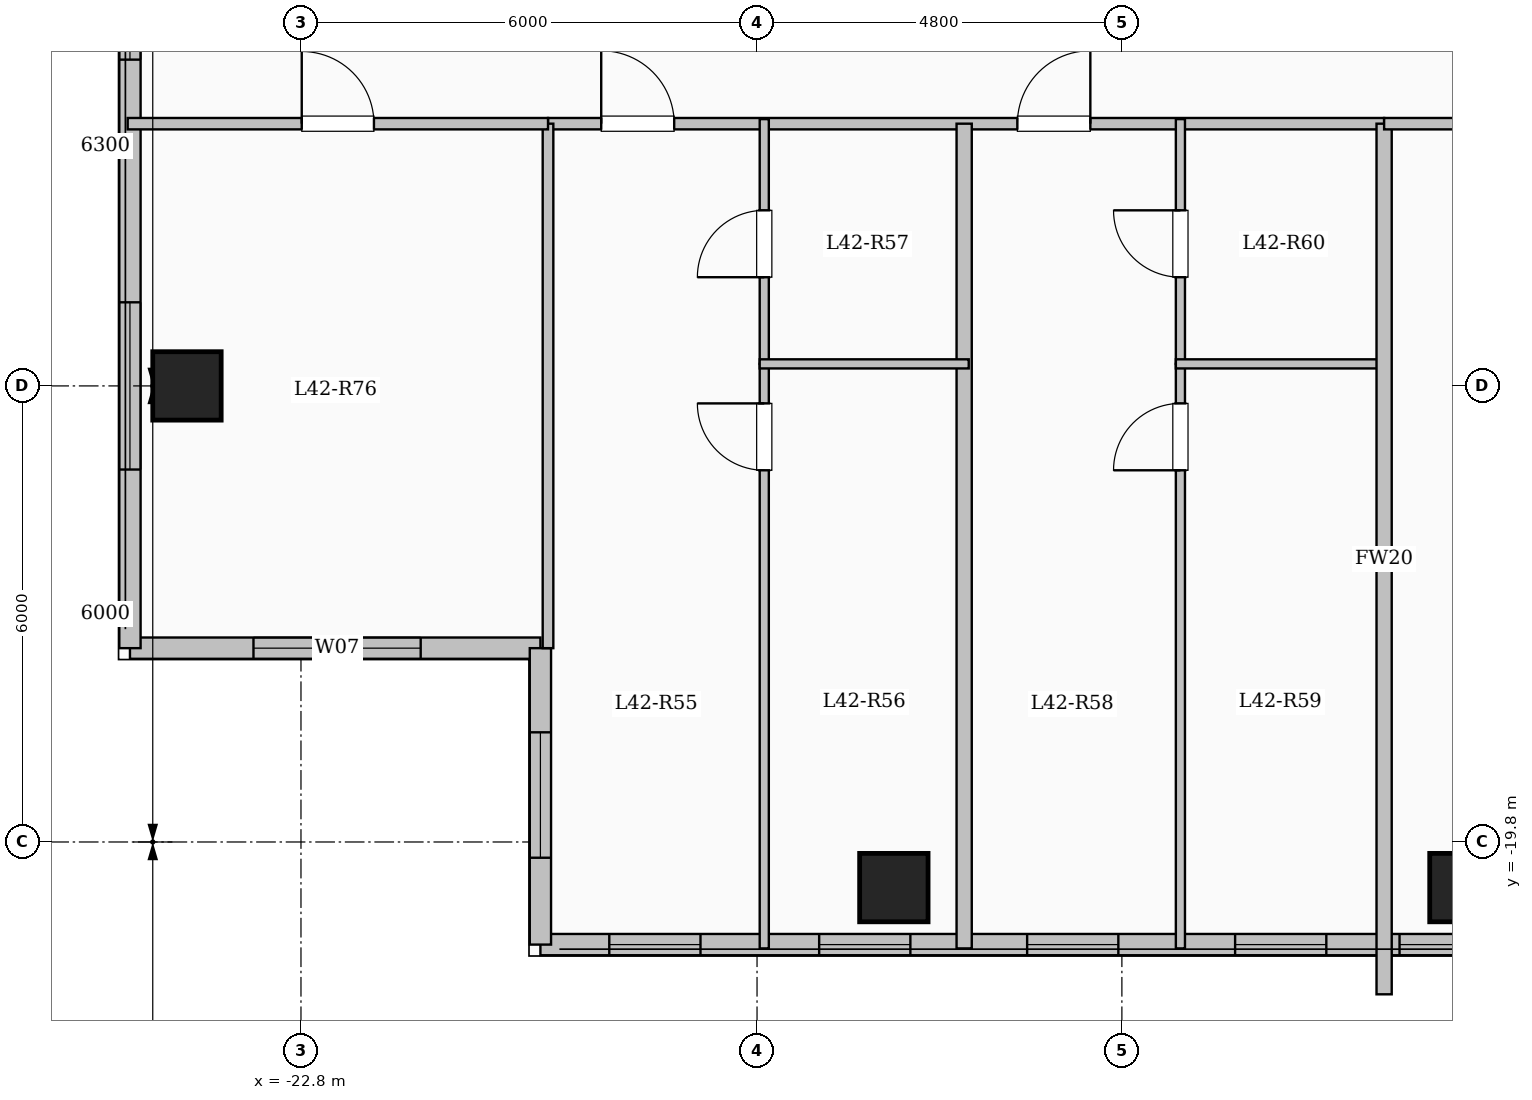
"""IFC4 building model, lengths in metres.
Left out: names, types, materials, properties, quantities, classifications, styles, units other than length and angle.
Written with IfcOpenShell. Run it as: python <this file> out.ifc"""

import sys

from ifc_helpers import new_model, si_unit, direction, frame, frame_2d, origin, origin_2d, place, context, subcontext, project, spatial, rectangle, extrude, element, fill, save


model = new_model("IFC4")
c1 = context("Model", 3, precision=1e-05, world=origin(), true_north=direction((0.0, 1.0)))
c2 = subcontext(c1, "Body", "Model", "MODEL_VIEW")
j1 = project(units=[si_unit("LENGTHUNIT", "METRE"), si_unit("PLANEANGLEUNIT", "RADIAN")], contexts=[c1])
p1 = place(None, origin())
s1 = spatial("IfcSite", under=j1, at=p1, CompositionType="ELEMENT")
p2 = place(p1, origin())
s2 = spatial("IfcBuilding", under=s1, at=p2, CompositionType="ELEMENT")
p3 = place(p2, frame((0.0, 0.0, 156.05)))
s3 = spatial("IfcBuildingStorey", under=s2, at=p3, CompositionType="ELEMENT", Elevation=156.05)
for number, where, z_axis, x_axis in (
    (1, (-15.0, -20.4, 0.0), (0.0, 0.0, 1.0), (1.0, 0.0, 0.0)),
    (2, (-7.5, -20.4, 0.0), (0.0, 0.0, 1.0), (1.0, 0.0, 0.0)),
    (3, (-24.3, -13.8, 0.0), (0.0, 0.0, 1.0), (1.0, 0.0, 0.0)),
):
    element("IfcColumn", number, at=place(p3, frame(where, z_axis=z_axis, x_axis=x_axis)), inside=s3, PredefinedType="COLUMN", context=c2, shape_type="SweptSolid", body=[
        extrude(rectangle(XDim=0.9, YDim=0.9, at=origin_2d()), origin(), (0.0, 0.0, 1.0), 3.35),
    ])
p4 = place(p3, frame((-19.65, -17.25, 0.0), z_axis=(0.0, 0.0, 1.0), x_axis=(-1.0, 0.0, 0.0)))
e4 = element("IfcWall", 4, at=p4, inside=s3, PredefinedType="SOLIDWALL", context=c2, shape_type="SweptSolid", body=[
    extrude(rectangle(XDim=5.4, YDim=0.28, at=frame_2d((2.7, 0.0))), origin(), (0.0, 0.0, 1.0), 3.1),
])
p5 = place(p4, frame((1.575, 0.0, 0.9)))
e5 = element("IfcOpeningElement", 5, at=p5, cuts=e4, PredefinedType="OPENING", context=c2, shape_type="SweptSolid", body=[
    extrude(rectangle(XDim=2.2, YDim=1.75, at=frame_2d((1.1, 0.875))), frame((0.0, 0.15, 0.0), z_axis=(0.0, -1.0, 0.0), x_axis=(1.0, 0.0, 0.0)), (0.0, 0.0, 1.0), 0.3),
])
p6 = place(p3, frame((-25.05, -17.25, 0.0), z_axis=(0.0, 0.0, 1.0), x_axis=(0.0, 1.0, 0.0)))
e6 = element("IfcWall", 6, at=p6, inside=s3, PredefinedType="SOLIDWALL", context=c2, shape_type="SweptSolid", body=[
    extrude(rectangle(XDim=34.5, YDim=0.28, at=frame_2d((17.25, 0.0))), origin(), (0.0, 0.0, 1.0), 3.1),
])
p7 = place(p6, frame((2.35, 0.0, 0.9)))
e7 = element("IfcOpeningElement", 7, at=p7, cuts=e6, PredefinedType="OPENING", context=c2, shape_type="SweptSolid", body=[
    extrude(rectangle(XDim=2.2, YDim=1.75, at=frame_2d((1.1, 0.875))), frame((0.0, 0.15, 0.0), z_axis=(0.0, -1.0, 0.0), x_axis=(1.0, 0.0, 0.0)), (0.0, 0.0, 1.0), 0.3),
])
p8 = place(p6, frame((7.742, 0.0, 0.9)))
e8 = element("IfcOpeningElement", 8, at=p8, cuts=e6, PredefinedType="OPENING", context=c2, shape_type="SweptSolid", body=[
    extrude(rectangle(XDim=1.5, YDim=1.65, at=frame_2d((0.75, 0.825))), frame((0.0, 0.15, 0.0), z_axis=(0.0, -1.0, 0.0), x_axis=(1.0, 0.0, 0.0)), (0.0, 0.0, 1.0), 0.3),
])
p9 = place(p6, frame((18.0, 0.0, 0.9)))
e9 = element("IfcOpeningElement", 9, at=p9, cuts=e6, PredefinedType="OPENING", context=c2, shape_type="SweptSolid", body=[
    extrude(rectangle(XDim=2.0, YDim=1.7, at=frame_2d((1.0, 0.85))), frame((0.0, 0.15, 0.0), z_axis=(0.0, -1.0, 0.0), x_axis=(1.0, 0.0, 0.0)), (0.0, 0.0, 1.0), 0.3),
])
p10 = place(p6, frame((28.375, 0.0, 0.95)))
e10 = element("IfcOpeningElement", 10, at=p10, cuts=e6, PredefinedType="OPENING", context=c2, shape_type="SweptSolid", body=[
    extrude(rectangle(XDim=1.0, YDim=1.5, at=frame_2d((0.5, 0.75))), frame((0.0, 0.15, 0.0), z_axis=(0.0, -1.0, 0.0), x_axis=(1.0, 0.0, 0.0)), (0.0, 0.0, 1.0), 0.3),
])
p11 = place(p6, frame((31.125, 0.0, 0.9)))
e11 = element("IfcOpeningElement", 11, at=p11, cuts=e6, PredefinedType="OPENING", context=c2, shape_type="SweptSolid", body=[
    extrude(rectangle(XDim=2.0, YDim=1.7, at=frame_2d((1.0, 0.85))), frame((0.0, 0.15, 0.0), z_axis=(0.0, -1.0, 0.0), x_axis=(1.0, 0.0, 0.0)), (0.0, 0.0, 1.0), 0.3),
])
p12 = place(p3, frame((-7.35, -21.15, 0.0), z_axis=(0.0, 0.0, 1.0), x_axis=(-1.0, 0.0, 0.0)))
e12 = element("IfcWall", 12, at=p12, inside=s3, PredefinedType="SOLIDWALL", context=c2, shape_type="SweptSolid", body=[
    extrude(rectangle(XDim=12.3, YDim=0.28, at=frame_2d((6.15, 0.0))), origin(), (0.0, 0.0, 1.0), 3.1),
])
p13 = place(p12, frame((0.147, 0.0, 0.95)))
e13 = element("IfcOpeningElement", 13, at=p13, cuts=e12, PredefinedType="OPENING", context=c2, shape_type="SweptSolid", body=[
    extrude(rectangle(XDim=0.85, YDim=1.5, at=frame_2d((0.425, 0.75))), frame((0.0, 0.15, 0.0), z_axis=(0.0, -1.0, 0.0), x_axis=(1.0, 0.0, 0.0)), (0.0, 0.0, 1.0), 0.3),
])
p14 = place(p12, frame((1.96, 0.0, 0.95)))
e14 = element("IfcOpeningElement", 14, at=p14, cuts=e12, PredefinedType="OPENING", context=c2, shape_type="SweptSolid", body=[
    extrude(rectangle(XDim=1.2, YDim=1.5, at=frame_2d((0.6, 0.75))), frame((0.0, 0.15, 0.0), z_axis=(0.0, -1.0, 0.0), x_axis=(1.0, 0.0, 0.0)), (0.0, 0.0, 1.0), 0.3),
])
p15 = place(p12, frame((4.697, 0.0, 0.95)))
e15 = element("IfcOpeningElement", 15, at=p15, cuts=e12, PredefinedType="OPENING", context=c2, shape_type="SweptSolid", body=[
    extrude(rectangle(XDim=1.2, YDim=1.5, at=frame_2d((0.6, 0.75))), frame((0.0, 0.15, 0.0), z_axis=(0.0, -1.0, 0.0), x_axis=(1.0, 0.0, 0.0)), (0.0, 0.0, 1.0), 0.3),
])
p16 = place(p12, frame((7.433, 0.0, 0.95)))
e16 = element("IfcOpeningElement", 16, at=p16, cuts=e12, PredefinedType="OPENING", context=c2, shape_type="SweptSolid", body=[
    extrude(rectangle(XDim=1.2, YDim=1.5, at=frame_2d((0.6, 0.75))), frame((0.0, 0.15, 0.0), z_axis=(0.0, -1.0, 0.0), x_axis=(1.0, 0.0, 0.0)), (0.0, 0.0, 1.0), 0.3),
])
p17 = place(p12, frame((10.194, 0.0, 0.95)))
e17 = element("IfcOpeningElement", 17, at=p17, cuts=e12, PredefinedType="OPENING", context=c2, shape_type="SweptSolid", body=[
    extrude(rectangle(XDim=1.2, YDim=1.5, at=frame_2d((0.6, 0.75))), frame((0.0, 0.15, 0.0), z_axis=(0.0, -1.0, 0.0), x_axis=(1.0, 0.0, 0.0)), (0.0, 0.0, 1.0), 0.3),
])
p18 = place(p3, frame((-19.65, -21.15, 0.0), z_axis=(0.0, 0.0, 1.0), x_axis=(0.0, 1.0, 0.0)))
e18 = element("IfcWall", 18, at=p18, inside=s3, PredefinedType="SOLIDWALL", context=c2, shape_type="SweptSolid", body=[
    extrude(rectangle(XDim=3.9, YDim=0.28, at=frame_2d((1.95, 0.0))), origin(), (0.0, 0.0, 1.0), 3.1),
])
p19 = place(p18, frame((1.143, 0.0, 0.9)))
e19 = element("IfcOpeningElement", 19, at=p19, cuts=e18, PredefinedType="OPENING", context=c2, shape_type="SweptSolid", body=[
    extrude(rectangle(XDim=1.65, YDim=1.6, at=frame_2d((0.825, 0.8))), frame((0.0, 0.15, 0.0), z_axis=(0.0, -1.0, 0.0), x_axis=(1.0, 0.0, 0.0)), (0.0, 0.0, 1.0), 0.3),
])
p20 = place(p3, frame((-19.55, -10.35, 0.0), z_axis=(0.0, 0.0, 1.0), x_axis=(1.0, 0.0, 0.0)))
e20 = element("IfcWall", 20, at=p20, inside=s3, PredefinedType="PARTITIONING", context=c2, shape_type="SweptSolid", body=[
    extrude(rectangle(XDim=11.0, YDim=0.15, at=frame_2d((5.5, 0.0))), origin(), (0.0, 0.0, 1.0), 3.1),
])
p21 = place(p20, frame((0.7, 0.0, 0.0)))
e21 = element("IfcOpeningElement", 21, at=p21, cuts=e20, PredefinedType="OPENING", context=c2, shape_type="SweptSolid", body=[
    extrude(rectangle(XDim=0.96, YDim=2.15, at=frame_2d((0.48, 1.075))), frame((0.0, 0.085, 0.0), z_axis=(0.0, -1.0, 0.0), x_axis=(1.0, 0.0, 0.0)), (0.0, 0.0, 1.0), 0.17),
])
p22 = place(p20, frame((6.175, 0.0, 0.0)))
e22 = element("IfcOpeningElement", 22, at=p22, cuts=e20, PredefinedType="OPENING", context=c2, shape_type="SweptSolid", body=[
    extrude(rectangle(XDim=0.96, YDim=2.15, at=frame_2d((0.48, 1.075))), frame((0.0, 0.085, 0.0), z_axis=(0.0, -1.0, 0.0), x_axis=(1.0, 0.0, 0.0)), (0.0, 0.0, 1.0), 0.17),
])
p23 = place(p3, frame((-14.075, -21.2, 0.0), z_axis=(0.0, 0.0, 1.0), x_axis=(0.0, 1.0, 0.0)))
e23 = element("IfcWall", 23, at=p23, inside=s3, PredefinedType="SOLIDWALL", context=c2, shape_type="SweptSolid", body=[
    extrude(rectangle(XDim=10.85, YDim=0.2, at=frame_2d((5.425, 0.0))), origin(), (0.0, 0.0, 1.0), 3.1),
])
p24 = place(p3, frame((-16.705, -21.2, 0.0), z_axis=(0.0, 0.0, 1.0), x_axis=(0.0, 1.0, 0.0)))
e24 = element("IfcWall", 24, at=p24, inside=s3, PredefinedType="PARTITIONING", context=c2, shape_type="SweptSolid", body=[
    extrude(rectangle(XDim=7.69, YDim=0.12, at=frame_2d((3.845, 0.0))), origin(), (0.0, 0.0, 1.0), 3.1),
])
p25 = place(p24, frame((6.29, 0.0, 0.0)))
e25 = element("IfcOpeningElement", 25, at=p25, cuts=e24, PredefinedType="OPENING", context=c2, shape_type="SweptSolid", body=[
    extrude(rectangle(XDim=0.88, YDim=2.1, at=frame_2d((0.44, 1.05))), frame((0.0, 0.07, 0.0), z_axis=(0.0, -1.0, 0.0), x_axis=(1.0, 0.0, 0.0)), (0.0, 0.0, 1.0), 0.14),
])
p26 = place(p3, frame((-16.705, -13.51, 0.0), z_axis=(0.0, 0.0, 1.0), x_axis=(0.0, 1.0, 0.0)))
e26 = element("IfcWall", 26, at=p26, inside=s3, PredefinedType="PARTITIONING", context=c2, shape_type="SweptSolid", body=[
    extrude(rectangle(XDim=3.22, YDim=0.12, at=frame_2d((1.61, 0.0))), origin(), (0.0, 0.0, 1.0), 3.1),
])
p27 = place(p26, frame((1.14, 0.0, 0.0)))
e27 = element("IfcOpeningElement", 27, at=p27, cuts=e26, PredefinedType="OPENING", context=c2, shape_type="SweptSolid", body=[
    extrude(rectangle(XDim=0.88, YDim=2.1, at=frame_2d((0.44, 1.05))), frame((0.0, 0.07, 0.0), z_axis=(0.0, -1.0, 0.0), x_axis=(1.0, 0.0, 0.0)), (0.0, 0.0, 1.0), 0.14),
])
p28 = place(p3, frame((-16.765, -13.51, 0.0), z_axis=(0.0, 0.0, 1.0), x_axis=(1.0, 0.0, 0.0)))
e28 = element("IfcWall", 28, at=p28, inside=s3, PredefinedType="PARTITIONING", context=c2, shape_type="SweptSolid", body=[
    extrude(rectangle(XDim=2.75, YDim=0.12, at=frame_2d((1.375, 0.0))), origin(), (0.0, 0.0, 1.0), 3.1),
])
p29 = place(p3, frame((-11.23, -21.2, 0.0), z_axis=(0.0, 0.0, 1.0), x_axis=(0.0, 1.0, 0.0)))
e29 = element("IfcWall", 29, at=p29, inside=s3, PredefinedType="PARTITIONING", context=c2, shape_type="SweptSolid", body=[
    extrude(rectangle(XDim=7.69, YDim=0.12, at=frame_2d((3.845, 0.0))), origin(), (0.0, 0.0, 1.0), 3.1),
])
p30 = place(p29, frame((6.29, 0.0, 0.0)))
e30 = element("IfcOpeningElement", 30, at=p30, cuts=e29, PredefinedType="OPENING", context=c2, shape_type="SweptSolid", body=[
    extrude(rectangle(XDim=0.88, YDim=2.1, at=frame_2d((0.44, 1.05))), frame((0.0, 0.07, 0.0), z_axis=(0.0, -1.0, 0.0), x_axis=(1.0, 0.0, 0.0)), (0.0, 0.0, 1.0), 0.14),
])
p31 = place(p3, frame((-11.23, -13.51, 0.0), z_axis=(0.0, 0.0, 1.0), x_axis=(0.0, 1.0, 0.0)))
e31 = element("IfcWall", 31, at=p31, inside=s3, PredefinedType="PARTITIONING", context=c2, shape_type="SweptSolid", body=[
    extrude(rectangle(XDim=3.22, YDim=0.12, at=frame_2d((1.61, 0.0))), origin(), (0.0, 0.0, 1.0), 3.1),
])
p32 = place(p31, frame((1.14, 0.0, 0.0)))
e32 = element("IfcOpeningElement", 32, at=p32, cuts=e31, PredefinedType="OPENING", context=c2, shape_type="SweptSolid", body=[
    extrude(rectangle(XDim=0.88, YDim=2.1, at=frame_2d((0.44, 1.05))), frame((0.0, 0.07, 0.0), z_axis=(0.0, -1.0, 0.0), x_axis=(1.0, 0.0, 0.0)), (0.0, 0.0, 1.0), 0.14),
])
p33 = place(p3, frame((-11.29, -13.51, 0.0), z_axis=(0.0, 0.0, 1.0), x_axis=(1.0, 0.0, 0.0)))
e33 = element("IfcWall", 33, at=p33, inside=s3, PredefinedType="PARTITIONING", context=c2, shape_type="SweptSolid", body=[
    extrude(rectangle(XDim=2.75, YDim=0.12, at=frame_2d((1.375, 0.0))), origin(), (0.0, 0.0, 1.0), 3.1),
])
p34 = place(p3, frame((-8.55, -21.804, 0.0), z_axis=(0.0, 0.0, 1.0), x_axis=(0.0, 1.0, 0.0)))
e34 = element("IfcWall", 34, at=p34, inside=s3, PredefinedType="SOLIDWALL", context=c2, shape_type="SweptSolid", body=[
    extrude(rectangle(XDim=11.454, YDim=0.2, at=frame_2d((5.727, 0.0))), origin(), (0.0, 0.0, 1.0), 3.1),
])
p35 = place(p3, frame((-8.55, -10.35, 0.0), z_axis=(0.0, 0.0, 1.0), x_axis=(1.0, 0.0, 0.0)))
e35 = element("IfcWall", 35, at=p35, inside=s3, PredefinedType="PARTITIONING", context=c2, shape_type="SweptSolid", body=[
    extrude(rectangle(XDim=17.1, YDim=0.15, at=frame_2d((8.55, 0.0))), origin(), (0.0, 0.0, 1.0), 3.1),
])
p36 = place(p35, frame((1.6, 0.0, 0.0)))
e36 = element("IfcOpeningElement", 36, at=p36, cuts=e35, PredefinedType="OPENING", context=c2, shape_type="SweptSolid", body=[
    extrude(rectangle(XDim=0.95, YDim=2.15, at=frame_2d((0.475, 1.075))), frame((0.0, 0.085, 0.0), z_axis=(0.0, -1.0, 0.0), x_axis=(1.0, 0.0, 0.0)), (0.0, 0.0, 1.0), 0.17),
])
p37 = place(p35, frame((10.5, 0.0, 0.0)))
e37 = element("IfcOpeningElement", 37, at=p37, cuts=e35, PredefinedType="OPENING", context=c2, shape_type="SweptSolid", body=[
    extrude(rectangle(XDim=0.95, YDim=2.15, at=frame_2d((0.475, 1.075))), frame((0.0, 0.085, 0.0), z_axis=(0.0, -1.0, 0.0), x_axis=(1.0, 0.0, 0.0)), (0.0, 0.0, 1.0), 0.17),
])
p38 = place(p3, frame((-19.55, -17.25, 0.0), z_axis=(0.0, 0.0, 1.0), x_axis=(0.0, 1.0, 0.0)))
e38 = element("IfcWall", 38, at=p38, inside=s3, PredefinedType="PARTITIONING", context=c2, shape_type="SweptSolid", body=[
    extrude(rectangle(XDim=6.9, YDim=0.14, at=frame_2d((3.45, 0.0))), origin(), (0.0, 0.0, 1.0), 3.1),
])
p39 = place(p3, frame((-25.08, -10.35, 0.0), z_axis=(0.0, 0.0, 1.0), x_axis=(1.0, 0.0, 0.0)))
e39 = element("IfcWall", 39, at=p39, inside=s3, PredefinedType="PARTITIONING", context=c2, shape_type="SweptSolid", body=[
    extrude(rectangle(XDim=5.53, YDim=0.15, at=frame_2d((2.765, 0.0))), origin(), (0.0, 0.0, 1.0), 3.1),
])
p40 = place(p39, frame((2.29, 0.0, 0.0)))
e40 = element("IfcOpeningElement", 40, at=p40, cuts=e39, PredefinedType="OPENING", context=c2, shape_type="SweptSolid", body=[
    extrude(rectangle(XDim=0.95, YDim=2.15, at=frame_2d((0.475, 1.075))), frame((0.0, 0.085, 0.0), z_axis=(0.0, -1.0, 0.0), x_axis=(1.0, 0.0, 0.0)), (0.0, 0.0, 1.0), 0.17),
])
p41 = place(p5, origin())
e41 = element("IfcWindow", 41, at=p41, inside=s3, PartitioningType="SINGLE_PANEL", PredefinedType="WINDOW", context=c2, shape_type="SweptSolid", body=[
    extrude(rectangle(XDim=2.2, YDim=1.75, at=frame_2d((1.1, 0.875))), frame((0.0, 0.03, 0.0), z_axis=(0.0, -1.0, 0.0), x_axis=(1.0, 0.0, 0.0)), (0.0, 0.0, 1.0), 0.06),
])
fill(e5, e41)
p42 = place(p7, origin())
e42 = element("IfcWindow", 42, at=p42, inside=s3, PartitioningType="SINGLE_PANEL", PredefinedType="WINDOW", context=c2, shape_type="SweptSolid", body=[
    extrude(rectangle(XDim=2.2, YDim=1.75, at=frame_2d((1.1, 0.875))), frame((0.0, 0.03, 0.0), z_axis=(0.0, -1.0, 0.0), x_axis=(1.0, 0.0, 0.0)), (0.0, 0.0, 1.0), 0.06),
])
fill(e7, e42)
p43 = place(p8, origin())
e43 = element("IfcWindow", 43, at=p43, inside=s3, PartitioningType="SINGLE_PANEL", PredefinedType="WINDOW", context=c2, shape_type="SweptSolid", body=[
    extrude(rectangle(XDim=1.5, YDim=1.65, at=frame_2d((0.75, 0.825))), frame((0.0, 0.03, 0.0), z_axis=(0.0, -1.0, 0.0), x_axis=(1.0, 0.0, 0.0)), (0.0, 0.0, 1.0), 0.06),
])
fill(e8, e43)
p44 = place(p13, origin())
e44 = element("IfcWindow", 44, at=p44, inside=s3, PartitioningType="SINGLE_PANEL", PredefinedType="WINDOW", context=c2, shape_type="SweptSolid", body=[
    extrude(rectangle(XDim=0.85, YDim=1.5, at=frame_2d((0.425, 0.75))), frame((0.0, 0.03, 0.0), z_axis=(0.0, -1.0, 0.0), x_axis=(1.0, 0.0, 0.0)), (0.0, 0.0, 1.0), 0.06),
])
fill(e13, e44)
p45 = place(p14, origin())
e45 = element("IfcWindow", 45, at=p45, inside=s3, PartitioningType="SINGLE_PANEL", PredefinedType="WINDOW", context=c2, shape_type="SweptSolid", body=[
    extrude(rectangle(XDim=1.2, YDim=1.5, at=frame_2d((0.6, 0.75))), frame((0.0, 0.03, 0.0), z_axis=(0.0, -1.0, 0.0), x_axis=(1.0, 0.0, 0.0)), (0.0, 0.0, 1.0), 0.06),
])
fill(e14, e45)
p46 = place(p15, origin())
e46 = element("IfcWindow", 46, at=p46, inside=s3, PartitioningType="SINGLE_PANEL", PredefinedType="WINDOW", context=c2, shape_type="SweptSolid", body=[
    extrude(rectangle(XDim=1.2, YDim=1.5, at=frame_2d((0.6, 0.75))), frame((0.0, 0.03, 0.0), z_axis=(0.0, -1.0, 0.0), x_axis=(1.0, 0.0, 0.0)), (0.0, 0.0, 1.0), 0.06),
])
fill(e15, e46)
p47 = place(p16, origin())
e47 = element("IfcWindow", 47, at=p47, inside=s3, PartitioningType="SINGLE_PANEL", PredefinedType="WINDOW", context=c2, shape_type="SweptSolid", body=[
    extrude(rectangle(XDim=1.2, YDim=1.5, at=frame_2d((0.6, 0.75))), frame((0.0, 0.03, 0.0), z_axis=(0.0, -1.0, 0.0), x_axis=(1.0, 0.0, 0.0)), (0.0, 0.0, 1.0), 0.06),
])
fill(e16, e47)
p48 = place(p17, origin())
e48 = element("IfcWindow", 48, at=p48, inside=s3, PartitioningType="SINGLE_PANEL", PredefinedType="WINDOW", context=c2, shape_type="SweptSolid", body=[
    extrude(rectangle(XDim=1.2, YDim=1.5, at=frame_2d((0.6, 0.75))), frame((0.0, 0.03, 0.0), z_axis=(0.0, -1.0, 0.0), x_axis=(1.0, 0.0, 0.0)), (0.0, 0.0, 1.0), 0.06),
])
fill(e17, e48)
p49 = place(p19, origin())
e49 = element("IfcWindow", 49, at=p49, inside=s3, PartitioningType="SINGLE_PANEL", PredefinedType="WINDOW", context=c2, shape_type="SweptSolid", body=[
    extrude(rectangle(XDim=1.65, YDim=1.6, at=frame_2d((0.825, 0.8))), frame((0.0, 0.03, 0.0), z_axis=(0.0, -1.0, 0.0), x_axis=(1.0, 0.0, 0.0)), (0.0, 0.0, 1.0), 0.06),
])
fill(e19, e49)
p50 = place(p21, origin())
e50 = element("IfcDoor", 50, at=p50, inside=s3, OperationType="SINGLE_SWING_LEFT", PredefinedType="DOOR", context=c2, shape_type="SweptSolid", body=[
    extrude(rectangle(XDim=0.96, YDim=2.15, at=frame_2d((0.48, 1.075))), frame((0.0, 0.025, 0.0), z_axis=(0.0, -1.0, 0.0), x_axis=(1.0, 0.0, 0.0)), (0.0, 0.0, 1.0), 0.05),
])
fill(e21, e50)
p51 = place(p25, origin())
e51 = element("IfcDoor", 51, at=p51, inside=s3, OperationType="SINGLE_SWING_RIGHT", PredefinedType="DOOR", context=c2, shape_type="SweptSolid", body=[
    extrude(rectangle(XDim=0.88, YDim=2.1, at=frame_2d((0.44, 1.05))), frame((0.0, 0.025, 0.0), z_axis=(0.0, -1.0, 0.0), x_axis=(1.0, 0.0, 0.0)), (0.0, 0.0, 1.0), 0.05),
])
fill(e25, e51)
p52 = place(p27, origin())
e52 = element("IfcDoor", 52, at=p52, inside=s3, OperationType="SINGLE_SWING_LEFT", PredefinedType="DOOR", context=c2, shape_type="SweptSolid", body=[
    extrude(rectangle(XDim=0.88, YDim=2.1, at=frame_2d((0.44, 1.05))), frame((0.0, 0.025, 0.0), z_axis=(0.0, -1.0, 0.0), x_axis=(1.0, 0.0, 0.0)), (0.0, 0.0, 1.0), 0.05),
])
fill(e27, e52)
p53 = place(p22, origin())
e53 = element("IfcDoor", 53, at=p53, inside=s3, OperationType="SINGLE_SWING_RIGHT", PredefinedType="DOOR", context=c2, shape_type="SweptSolid", body=[
    extrude(rectangle(XDim=0.96, YDim=2.15, at=frame_2d((0.48, 1.075))), frame((0.0, 0.025, 0.0), z_axis=(0.0, -1.0, 0.0), x_axis=(1.0, 0.0, 0.0)), (0.0, 0.0, 1.0), 0.05),
])
fill(e22, e53)
p54 = place(p30, origin())
e54 = element("IfcDoor", 54, at=p54, inside=s3, OperationType="SINGLE_SWING_LEFT", PredefinedType="DOOR", context=c2, shape_type="SweptSolid", body=[
    extrude(rectangle(XDim=0.88, YDim=2.1, at=frame_2d((0.44, 1.05))), frame((0.0, 0.025, 0.0), z_axis=(0.0, -1.0, 0.0), x_axis=(1.0, 0.0, 0.0)), (0.0, 0.0, 1.0), 0.05),
])
fill(e30, e54)
p55 = place(p32, origin())
e55 = element("IfcDoor", 55, at=p55, inside=s3, OperationType="SINGLE_SWING_RIGHT", PredefinedType="DOOR", context=c2, shape_type="SweptSolid", body=[
    extrude(rectangle(XDim=0.88, YDim=2.1, at=frame_2d((0.44, 1.05))), frame((0.0, 0.025, 0.0), z_axis=(0.0, -1.0, 0.0), x_axis=(1.0, 0.0, 0.0)), (0.0, 0.0, 1.0), 0.05),
])
fill(e32, e55)
p56 = place(p40, origin())
e56 = element("IfcDoor", 56, at=p56, inside=s3, OperationType="SINGLE_SWING_LEFT", PredefinedType="DOOR", context=c2, shape_type="SweptSolid", body=[
    extrude(rectangle(XDim=0.95, YDim=2.15, at=frame_2d((0.475, 1.075))), frame((0.0, 0.025, 0.0), z_axis=(0.0, -1.0, 0.0), x_axis=(1.0, 0.0, 0.0)), (0.0, 0.0, 1.0), 0.05),
])
fill(e40, e56)
save(model, sys.argv[1])
